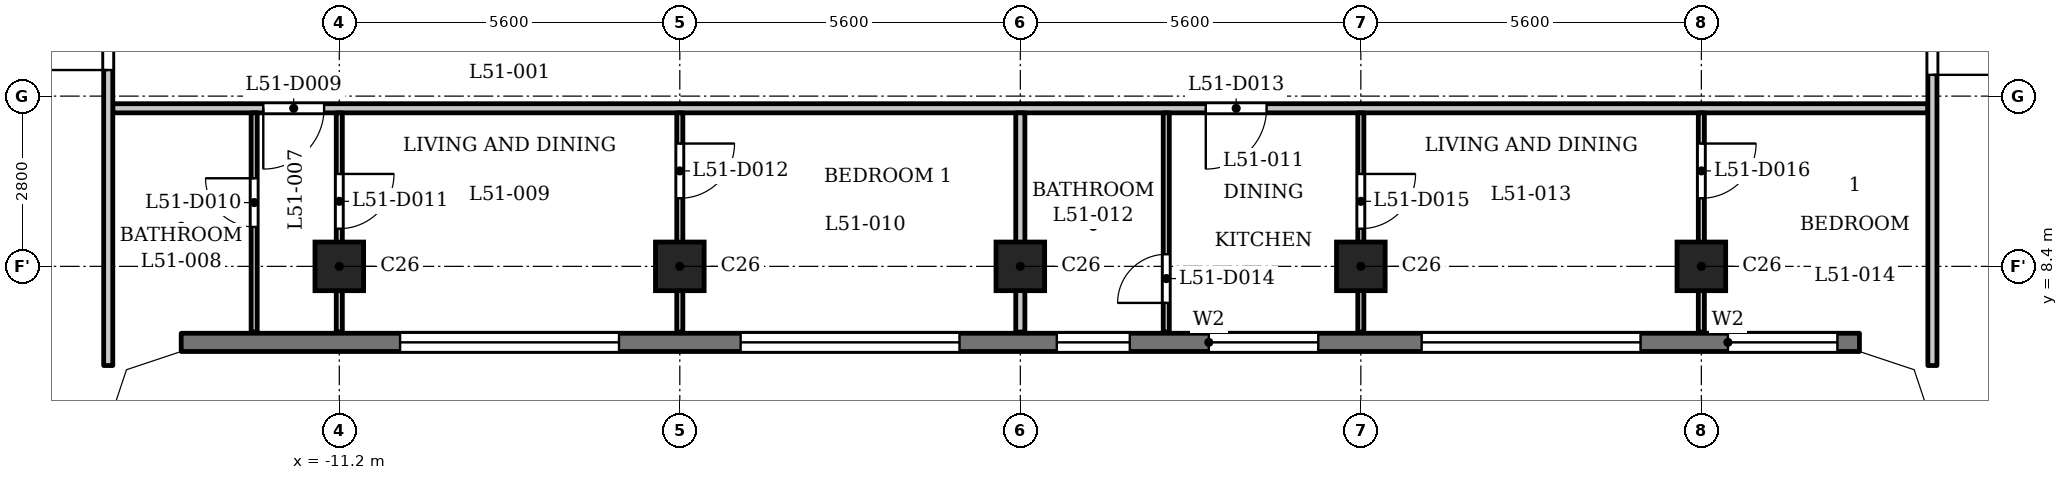
"""IFC4 building model, lengths in metres.
Left out: names, types, materials, properties, quantities, classifications, styles, units other than length and angle.
Written with IfcOpenShell. Run it as: python <this file> out.ifc"""

import sys

from ifc_helpers import new_model, si_unit, direction, frame, frame_2d, origin, origin_2d, place, context, subcontext, project, spatial, polyline, rectangle, outline, extrude, element, fill, save


model = new_model("IFC4")
c1 = context("Model", 3, precision=1e-05, world=origin(), true_north=direction((0.0, 1.0)))
c2 = subcontext(c1, "Body", "Model", "MODEL_VIEW")
j1 = project(units=[si_unit("LENGTHUNIT", "METRE"), si_unit("PLANEANGLEUNIT", "RADIAN")], contexts=[c1])
p1 = place(None, origin())
s1 = spatial("IfcSite", under=j1, at=p1, CompositionType="ELEMENT")
p2 = place(p1, origin())
s2 = spatial("IfcBuilding", under=s1, at=p2, CompositionType="ELEMENT")
p3 = place(p2, frame((0.0, 0.0, 199.4)))
s3 = spatial("IfcBuildingStorey", under=s2, at=p3, CompositionType="ELEMENT", Elevation=199.4)
for number, where, z_axis, x_axis in (
    (1, (-11.2, 8.4, 0.0), (0.0, 0.0, 1.0), (1.0, 0.0, 0.0)),
    (2, (-5.6, 8.4, 0.0), (0.0, 0.0, 1.0), (1.0, 0.0, 0.0)),
    (3, (0.0, 8.4, 0.0), (0.0, 0.0, 1.0), (1.0, 0.0, 0.0)),
    (4, (5.6, 8.4, 0.0), (0.0, 0.0, 1.0), (1.0, 0.0, 0.0)),
    (5, (11.2, 8.4, 0.0), (0.0, 0.0, 1.0), (1.0, 0.0, 0.0)),
):
    element("IfcColumn", number, at=place(p3, frame(where, z_axis=z_axis, x_axis=x_axis)), inside=s3, PredefinedType="COLUMN", context=c2, shape_type="SweptSolid", body=[
        extrude(rectangle(XDim=0.8, YDim=0.8, at=origin_2d()), origin(), (0.0, 0.0, 1.0), 3.5),
    ])
p4 = place(p3, frame((-13.8, 7.15, 0.0), z_axis=(0.0, 0.0, 1.0), x_axis=(1.0, 0.0, 0.0)))
e6 = element("IfcWall", 6, at=p4, inside=s3, PredefinedType="SOLIDWALL", context=c2, shape_type="SweptSolid", body=[
    extrude(rectangle(XDim=27.6, YDim=0.3, at=frame_2d((13.8, 0.0))), origin(), (0.0, 0.0, 1.0), 3.2),
])
p5 = place(p4, frame((3.6, 0.0, 1.2)))
e7 = element("IfcOpeningElement", 7, at=p5, cuts=e6, PredefinedType="OPENING", context=c2, shape_type="SweptSolid", body=[
    extrude(rectangle(XDim=3.6, YDim=0.95, at=frame_2d((1.8, 0.475))), frame((0.0, 0.16, 0.0), z_axis=(0.0, -1.0, 0.0), x_axis=(1.0, 0.0, 0.0)), (0.0, 0.0, 1.0), 0.32),
])
p6 = place(p4, frame((9.2, 0.0, 1.2)))
e8 = element("IfcOpeningElement", 8, at=p6, cuts=e6, PredefinedType="OPENING", context=c2, shape_type="SweptSolid", body=[
    extrude(rectangle(XDim=3.6, YDim=0.95, at=frame_2d((1.8, 0.475))), frame((0.0, 0.16, 0.0), z_axis=(0.0, -1.0, 0.0), x_axis=(1.0, 0.0, 0.0)), (0.0, 0.0, 1.0), 0.32),
])
p7 = place(p4, frame((14.4, 0.0, 0.6)))
e9 = element("IfcOpeningElement", 9, at=p7, cuts=e6, PredefinedType="OPENING", context=c2, shape_type="SweptSolid", body=[
    extrude(rectangle(XDim=1.2, YDim=1.55, at=frame_2d((0.6, 0.775))), frame((0.0, 0.16, 0.0), z_axis=(0.0, -1.0, 0.0), x_axis=(1.0, 0.0, 0.0)), (0.0, 0.0, 1.0), 0.32),
])
p8 = place(p4, frame((16.9, 0.0, 0.9)))
e10 = element("IfcOpeningElement", 10, at=p8, cuts=e6, PredefinedType="OPENING", context=c2, shape_type="SweptSolid", body=[
    extrude(rectangle(XDim=1.8, YDim=1.25, at=frame_2d((0.9, 0.625))), frame((0.0, 0.16, 0.0), z_axis=(0.0, -1.0, 0.0), x_axis=(1.0, 0.0, 0.0)), (0.0, 0.0, 1.0), 0.32),
])
p9 = place(p4, frame((20.4, 0.0, 1.2)))
e11 = element("IfcOpeningElement", 11, at=p9, cuts=e6, PredefinedType="OPENING", context=c2, shape_type="SweptSolid", body=[
    extrude(rectangle(XDim=3.6, YDim=0.95, at=frame_2d((1.8, 0.475))), frame((0.0, 0.16, 0.0), z_axis=(0.0, -1.0, 0.0), x_axis=(1.0, 0.0, 0.0)), (0.0, 0.0, 1.0), 0.32),
])
p10 = place(p4, frame((25.438, 0.0, 0.9)))
e12 = element("IfcOpeningElement", 12, at=p10, cuts=e6, PredefinedType="OPENING", context=c2, shape_type="SweptSolid", body=[
    extrude(rectangle(XDim=1.8, YDim=1.25, at=frame_2d((0.9, 0.625))), frame((0.0, 0.16, 0.0), z_axis=(0.0, -1.0, 0.0), x_axis=(1.0, 0.0, 0.0)), (0.0, 0.0, 1.0), 0.32),
])
p11 = place(p3, frame((-14.925, 11.0, 0.0), z_axis=(0.0, 0.0, 1.0), x_axis=(1.0, 0.0, 0.0)))
e13 = element("IfcWall", 13, at=p11, inside=s3, PredefinedType="PARTITIONING", context=c2, shape_type="SweptSolid", body=[
    extrude(rectangle(XDim=29.85, YDim=0.15, at=frame_2d((14.925, 0.0))), origin(), (0.0, 0.0, 1.0), 3.2),
])
p12 = place(p11, frame((2.475, 0.0, 0.0)))
e14 = element("IfcOpeningElement", 14, at=p12, cuts=e13, PredefinedType="OPENING", context=c2, shape_type="SweptSolid", body=[
    extrude(rectangle(XDim=1.0, YDim=2.1, at=frame_2d((0.5, 1.05))), frame((0.0, 0.085, 0.0), z_axis=(0.0, -1.0, 0.0), x_axis=(1.0, 0.0, 0.0)), (0.0, 0.0, 1.0), 0.17),
])
p13 = place(p11, frame((17.975, 0.0, 0.0)))
e15 = element("IfcOpeningElement", 15, at=p13, cuts=e13, PredefinedType="OPENING", context=c2, shape_type="SweptSolid", body=[
    extrude(rectangle(XDim=1.0, YDim=2.1, at=frame_2d((0.5, 1.05))), frame((0.0, 0.085, 0.0), z_axis=(0.0, -1.0, 0.0), x_axis=(1.0, 0.0, 0.0)), (0.0, 0.0, 1.0), 0.17),
])
p14 = place(p3, frame((-15.0, 6.769, 0.0), z_axis=(0.0, 0.0, 1.0), x_axis=(0.0, 1.0, 0.0)))
e16 = element("IfcWall", 16, at=p14, inside=s3, PredefinedType="PARTITIONING", context=c2, shape_type="SweptSolid", body=[
    extrude(rectangle(XDim=6.356, YDim=0.15, at=frame_2d((3.178, 0.0))), origin(), (0.0, 0.0, 1.0), 3.2),
])
p15 = place(p14, frame((4.86, 0.0, 0.0)))
e17 = element("IfcOpeningElement", 17, at=p15, cuts=e16, PredefinedType="OPENING", context=c2, shape_type="SweptSolid", body=[
    extrude(rectangle(XDim=1.0, YDim=2.1, at=frame_2d((0.5, 1.05))), frame((0.0, 0.085, 0.0), z_axis=(0.0, -1.0, 0.0), x_axis=(1.0, 0.0, 0.0)), (0.0, 0.0, 1.0), 0.17),
])
p16 = place(p3, frame((-12.6, 7.32, 0.0), z_axis=(0.0, 0.0, 1.0), x_axis=(0.0, 1.0, 0.0)))
e18 = element("IfcWall", 18, at=p16, inside=s3, PredefinedType="PARTITIONING", context=c2, shape_type="SweptSolid", body=[
    extrude(rectangle(XDim=3.605, YDim=0.1, at=frame_2d((1.802, 0.0))), origin(), (0.0, 0.0, 1.0), 3.2),
])
p17 = place(p16, frame((1.729, 0.0, 0.0)))
e19 = element("IfcOpeningElement", 19, at=p17, cuts=e18, PredefinedType="OPENING", context=c2, shape_type="SweptSolid", body=[
    extrude(rectangle(XDim=0.8, YDim=2.1, at=frame_2d((0.4, 1.05))), frame((0.0, 0.06, 0.0), z_axis=(0.0, -1.0, 0.0), x_axis=(1.0, 0.0, 0.0)), (0.0, 0.0, 1.0), 0.12),
])
p18 = place(p3, frame((-11.2, 7.32, 0.0), z_axis=(0.0, 0.0, 1.0), x_axis=(0.0, 1.0, 0.0)))
e20 = element("IfcWall", 20, at=p18, inside=s3, PredefinedType="PARTITIONING", context=c2, shape_type="SweptSolid", body=[
    extrude(rectangle(XDim=3.605, YDim=0.1, at=frame_2d((1.802, 0.0))), origin(), (0.0, 0.0, 1.0), 3.2),
])
p19 = place(p18, frame((1.7, 0.0, 0.0)))
e21 = element("IfcOpeningElement", 21, at=p19, cuts=e20, PredefinedType="OPENING", context=c2, shape_type="SweptSolid", body=[
    extrude(rectangle(XDim=0.9, YDim=2.1, at=frame_2d((0.45, 1.05))), frame((0.0, 0.06, 0.0), z_axis=(0.0, -1.0, 0.0), x_axis=(1.0, 0.0, 0.0)), (0.0, 0.0, 1.0), 0.12),
])
p20 = place(p3, frame((-5.6, 7.32, 0.0), z_axis=(0.0, 0.0, 1.0), x_axis=(0.0, 1.0, 0.0)))
e22 = element("IfcWall", 22, at=p20, inside=s3, PredefinedType="PARTITIONING", context=c2, shape_type="SweptSolid", body=[
    extrude(rectangle(XDim=3.605, YDim=0.1, at=frame_2d((1.802, 0.0))), origin(), (0.0, 0.0, 1.0), 3.2),
])
p21 = place(p20, frame((2.2, 0.0, 0.0)))
e23 = element("IfcOpeningElement", 23, at=p21, cuts=e22, PredefinedType="OPENING", context=c2, shape_type="SweptSolid", body=[
    extrude(rectangle(XDim=0.9, YDim=2.1, at=frame_2d((0.45, 1.05))), frame((0.0, 0.06, 0.0), z_axis=(0.0, -1.0, 0.0), x_axis=(1.0, 0.0, 0.0)), (0.0, 0.0, 1.0), 0.12),
])
p22 = place(p3, frame((0.0, 7.32, 0.0), z_axis=(0.0, 0.0, 1.0), x_axis=(0.0, 1.0, 0.0)))
e24 = element("IfcWall", 24, at=p22, inside=s3, PredefinedType="PARTITIONING", context=c2, shape_type="SweptSolid", body=[
    extrude(rectangle(XDim=3.605, YDim=0.15, at=frame_2d((1.802, 0.0))), origin(), (0.0, 0.0, 1.0), 3.2),
])
p23 = place(p3, frame((2.4, 7.32, 0.0), z_axis=(0.0, 0.0, 1.0), x_axis=(0.0, 1.0, 0.0)))
e25 = element("IfcWall", 25, at=p23, inside=s3, PredefinedType="PARTITIONING", context=c2, shape_type="SweptSolid", body=[
    extrude(rectangle(XDim=3.605, YDim=0.1, at=frame_2d((1.802, 0.0))), origin(), (0.0, 0.0, 1.0), 3.2),
])
p24 = place(p23, frame((0.479, 0.0, 0.0)))
e26 = element("IfcOpeningElement", 26, at=p24, cuts=e25, PredefinedType="OPENING", context=c2, shape_type="SweptSolid", body=[
    extrude(rectangle(XDim=0.8, YDim=2.1, at=frame_2d((0.4, 1.05))), frame((0.0, 0.06, 0.0), z_axis=(0.0, -1.0, 0.0), x_axis=(1.0, 0.0, 0.0)), (0.0, 0.0, 1.0), 0.12),
])
p25 = place(p3, frame((5.6, 7.32, 0.0), z_axis=(0.0, 0.0, 1.0), x_axis=(0.0, 1.0, 0.0)))
e27 = element("IfcWall", 27, at=p25, inside=s3, PredefinedType="PARTITIONING", context=c2, shape_type="SweptSolid", body=[
    extrude(rectangle(XDim=3.605, YDim=0.1, at=frame_2d((1.802, 0.0))), origin(), (0.0, 0.0, 1.0), 3.2),
])
p26 = place(p25, frame((1.7, 0.0, 0.0)))
e28 = element("IfcOpeningElement", 28, at=p26, cuts=e27, PredefinedType="OPENING", context=c2, shape_type="SweptSolid", body=[
    extrude(rectangle(XDim=0.9, YDim=2.1, at=frame_2d((0.45, 1.05))), frame((0.0, 0.06, 0.0), z_axis=(0.0, -1.0, 0.0), x_axis=(1.0, 0.0, 0.0)), (0.0, 0.0, 1.0), 0.12),
])
p27 = place(p3, frame((11.2, 7.32, 0.0), z_axis=(0.0, 0.0, 1.0), x_axis=(0.0, 1.0, 0.0)))
e29 = element("IfcWall", 29, at=p27, inside=s3, PredefinedType="PARTITIONING", context=c2, shape_type="SweptSolid", body=[
    extrude(rectangle(XDim=3.605, YDim=0.1, at=frame_2d((1.802, 0.0))), origin(), (0.0, 0.0, 1.0), 3.2),
])
p28 = place(p27, frame((2.2, 0.0, 0.0)))
e30 = element("IfcOpeningElement", 30, at=p28, cuts=e29, PredefinedType="OPENING", context=c2, shape_type="SweptSolid", body=[
    extrude(rectangle(XDim=0.9, YDim=2.1, at=frame_2d((0.45, 1.05))), frame((0.0, 0.06, 0.0), z_axis=(0.0, -1.0, 0.0), x_axis=(1.0, 0.0, 0.0)), (0.0, 0.0, 1.0), 0.12),
])
p29 = place(p3, frame((15.0, 6.769, 0.0), z_axis=(0.0, 0.0, 1.0), x_axis=(0.0, 1.0, 0.0)))
e31 = element("IfcWall", 31, at=p29, inside=s3, PredefinedType="PARTITIONING", context=c2, shape_type="SweptSolid", body=[
    extrude(rectangle(XDim=6.356, YDim=0.15, at=frame_2d((3.178, 0.0))), origin(), (0.0, 0.0, 1.0), 3.2),
])
p30 = place(p29, frame((4.781, 0.0, 0.0)))
e32 = element("IfcOpeningElement", 32, at=p30, cuts=e31, PredefinedType="OPENING", context=c2, shape_type="SweptSolid", body=[
    extrude(rectangle(XDim=1.0, YDim=2.1, at=frame_2d((0.5, 1.05))), frame((0.0, 0.085, 0.0), z_axis=(0.0, -1.0, 0.0), x_axis=(1.0, 0.0, 0.0)), (0.0, 0.0, 1.0), 0.17),
])
p31 = place(p3, origin())
e33 = element("IfcWall", 33, at=p31, inside=s3, PredefinedType="SOLIDWALL", context=c2, shape_type="SweptSolid", body=[
    extrude(outline(polyline([(-13.849, 7.3), (-14.937, 6.937), (-15.3, 5.849), (-15.3, 5.8), (-15.0, 5.8), (-14.7, 6.7), (-13.8, 7.0), (-13.8, 7.3), (-13.849, 7.3)])), origin(), (0.0, 0.0, 1.0), 3.2),
])
e34 = element("IfcWall", 34, at=p31, inside=s3, PredefinedType="SOLIDWALL", context=c2, shape_type="SweptSolid", body=[
    extrude(outline(polyline([(14.937, 6.937), (13.849, 7.3), (13.8, 7.3), (13.8, 7.0), (14.7, 6.7), (15.0, 5.8), (15.3, 5.8), (15.3, 5.849), (14.937, 6.937)])), origin(), (0.0, 0.0, 1.0), 3.2),
])
p32 = place(p15, origin())
e35 = element("IfcDoor", 35, at=p32, inside=s3, OperationType="SINGLE_SWING_RIGHT", PredefinedType="DOOR", context=c2, shape_type="SweptSolid", body=[
    extrude(rectangle(XDim=1.0, YDim=2.1, at=frame_2d((0.5, 1.05))), frame((0.0, 0.025, 0.0), z_axis=(0.0, -1.0, 0.0), x_axis=(1.0, 0.0, 0.0)), (0.0, 0.0, 1.0), 0.05),
])
fill(e17, e35)
p33 = place(p30, origin())
e36 = element("IfcDoor", 36, at=p33, inside=s3, OperationType="SINGLE_SWING_LEFT", PredefinedType="DOOR", context=c2, shape_type="SweptSolid", body=[
    extrude(rectangle(XDim=1.0, YDim=2.1, at=frame_2d((0.5, 1.05))), frame((0.0, 0.025, 0.0), z_axis=(0.0, -1.0, 0.0), x_axis=(1.0, 0.0, 0.0)), (0.0, 0.0, 1.0), 0.05),
])
fill(e32, e36)
p34 = place(p12, origin())
e37 = element("IfcDoor", 37, at=p34, inside=s3, OperationType="SINGLE_SWING_LEFT", PredefinedType="DOOR", context=c2, shape_type="SweptSolid", body=[
    extrude(rectangle(XDim=1.0, YDim=2.1, at=frame_2d((0.5, 1.05))), frame((0.0, 0.025, 0.0), z_axis=(0.0, -1.0, 0.0), x_axis=(1.0, 0.0, 0.0)), (0.0, 0.0, 1.0), 0.05),
])
fill(e14, e37)
p35 = place(p17, origin())
e38 = element("IfcDoor", 38, at=p35, inside=s3, OperationType="SINGLE_SWING_LEFT", PredefinedType="DOOR", context=c2, shape_type="SweptSolid", body=[
    extrude(rectangle(XDim=0.8, YDim=2.1, at=frame_2d((0.4, 1.05))), frame((0.0, 0.025, 0.0), z_axis=(0.0, -1.0, 0.0), x_axis=(1.0, 0.0, 0.0)), (0.0, 0.0, 1.0), 0.05),
])
fill(e19, e38)
p36 = place(p19, origin())
e39 = element("IfcDoor", 39, at=p36, inside=s3, OperationType="SINGLE_SWING_RIGHT", PredefinedType="DOOR", context=c2, shape_type="SweptSolid", body=[
    extrude(rectangle(XDim=0.9, YDim=2.1, at=frame_2d((0.45, 1.05))), frame((0.0, 0.025, 0.0), z_axis=(0.0, -1.0, 0.0), x_axis=(1.0, 0.0, 0.0)), (0.0, 0.0, 1.0), 0.05),
])
fill(e21, e39)
p37 = place(p21, origin())
e40 = element("IfcDoor", 40, at=p37, inside=s3, OperationType="SINGLE_SWING_RIGHT", PredefinedType="DOOR", context=c2, shape_type="SweptSolid", body=[
    extrude(rectangle(XDim=0.9, YDim=2.1, at=frame_2d((0.45, 1.05))), frame((0.0, 0.025, 0.0), z_axis=(0.0, -1.0, 0.0), x_axis=(1.0, 0.0, 0.0)), (0.0, 0.0, 1.0), 0.05),
])
fill(e23, e40)
p38 = place(p13, origin())
e41 = element("IfcDoor", 41, at=p38, inside=s3, OperationType="SINGLE_SWING_LEFT", PredefinedType="DOOR", context=c2, shape_type="SweptSolid", body=[
    extrude(rectangle(XDim=1.0, YDim=2.1, at=frame_2d((0.5, 1.05))), frame((0.0, 0.025, 0.0), z_axis=(0.0, -1.0, 0.0), x_axis=(1.0, 0.0, 0.0)), (0.0, 0.0, 1.0), 0.05),
])
fill(e15, e41)
p39 = place(p24, origin())
e42 = element("IfcDoor", 42, at=p39, inside=s3, OperationType="SINGLE_SWING_RIGHT", PredefinedType="DOOR", context=c2, shape_type="SweptSolid", body=[
    extrude(rectangle(XDim=0.8, YDim=2.1, at=frame_2d((0.4, 1.05))), frame((0.0, 0.025, 0.0), z_axis=(0.0, -1.0, 0.0), x_axis=(1.0, 0.0, 0.0)), (0.0, 0.0, 1.0), 0.05),
])
fill(e26, e42)
p40 = place(p26, origin())
e43 = element("IfcDoor", 43, at=p40, inside=s3, OperationType="SINGLE_SWING_RIGHT", PredefinedType="DOOR", context=c2, shape_type="SweptSolid", body=[
    extrude(rectangle(XDim=0.9, YDim=2.1, at=frame_2d((0.45, 1.05))), frame((0.0, 0.025, 0.0), z_axis=(0.0, -1.0, 0.0), x_axis=(1.0, 0.0, 0.0)), (0.0, 0.0, 1.0), 0.05),
])
fill(e28, e43)
p41 = place(p28, origin())
e44 = element("IfcDoor", 44, at=p41, inside=s3, OperationType="SINGLE_SWING_RIGHT", PredefinedType="DOOR", context=c2, shape_type="SweptSolid", body=[
    extrude(rectangle(XDim=0.9, YDim=2.1, at=frame_2d((0.45, 1.05))), frame((0.0, 0.025, 0.0), z_axis=(0.0, -1.0, 0.0), x_axis=(1.0, 0.0, 0.0)), (0.0, 0.0, 1.0), 0.05),
])
fill(e30, e44)
p42 = place(p5, origin())
e45 = element("IfcWindow", 45, at=p42, inside=s3, PartitioningType="SINGLE_PANEL", PredefinedType="WINDOW", context=c2, shape_type="SweptSolid", body=[
    extrude(rectangle(XDim=3.6, YDim=0.95, at=frame_2d((1.8, 0.475))), frame((0.0, 0.03, 0.0), z_axis=(0.0, -1.0, 0.0), x_axis=(1.0, 0.0, 0.0)), (0.0, 0.0, 1.0), 0.06),
])
fill(e7, e45)
p43 = place(p6, origin())
e46 = element("IfcWindow", 46, at=p43, inside=s3, PartitioningType="SINGLE_PANEL", PredefinedType="WINDOW", context=c2, shape_type="SweptSolid", body=[
    extrude(rectangle(XDim=3.6, YDim=0.95, at=frame_2d((1.8, 0.475))), frame((0.0, 0.03, 0.0), z_axis=(0.0, -1.0, 0.0), x_axis=(1.0, 0.0, 0.0)), (0.0, 0.0, 1.0), 0.06),
])
fill(e8, e46)
p44 = place(p7, origin())
e47 = element("IfcWindow", 47, at=p44, inside=s3, PartitioningType="SINGLE_PANEL", PredefinedType="WINDOW", context=c2, shape_type="SweptSolid", body=[
    extrude(rectangle(XDim=1.2, YDim=1.55, at=frame_2d((0.6, 0.775))), frame((0.0, 0.03, 0.0), z_axis=(0.0, -1.0, 0.0), x_axis=(1.0, 0.0, 0.0)), (0.0, 0.0, 1.0), 0.06),
])
fill(e9, e47)
p45 = place(p8, origin())
e48 = element("IfcWindow", 48, at=p45, inside=s3, PartitioningType="SINGLE_PANEL", PredefinedType="WINDOW", context=c2, shape_type="SweptSolid", body=[
    extrude(rectangle(XDim=1.8, YDim=1.25, at=frame_2d((0.9, 0.625))), frame((0.0, 0.03, 0.0), z_axis=(0.0, -1.0, 0.0), x_axis=(1.0, 0.0, 0.0)), (0.0, 0.0, 1.0), 0.06),
])
fill(e10, e48)
p46 = place(p9, origin())
e49 = element("IfcWindow", 49, at=p46, inside=s3, PartitioningType="SINGLE_PANEL", PredefinedType="WINDOW", context=c2, shape_type="SweptSolid", body=[
    extrude(rectangle(XDim=3.6, YDim=0.95, at=frame_2d((1.8, 0.475))), frame((0.0, 0.03, 0.0), z_axis=(0.0, -1.0, 0.0), x_axis=(1.0, 0.0, 0.0)), (0.0, 0.0, 1.0), 0.06),
])
fill(e11, e49)
p47 = place(p10, origin())
e50 = element("IfcWindow", 50, at=p47, inside=s3, PartitioningType="SINGLE_PANEL", PredefinedType="WINDOW", context=c2, shape_type="SweptSolid", body=[
    extrude(rectangle(XDim=1.8, YDim=1.25, at=frame_2d((0.9, 0.625))), frame((0.0, 0.03, 0.0), z_axis=(0.0, -1.0, 0.0), x_axis=(1.0, 0.0, 0.0)), (0.0, 0.0, 1.0), 0.06),
])
fill(e12, e50)
save(model, sys.argv[1])
